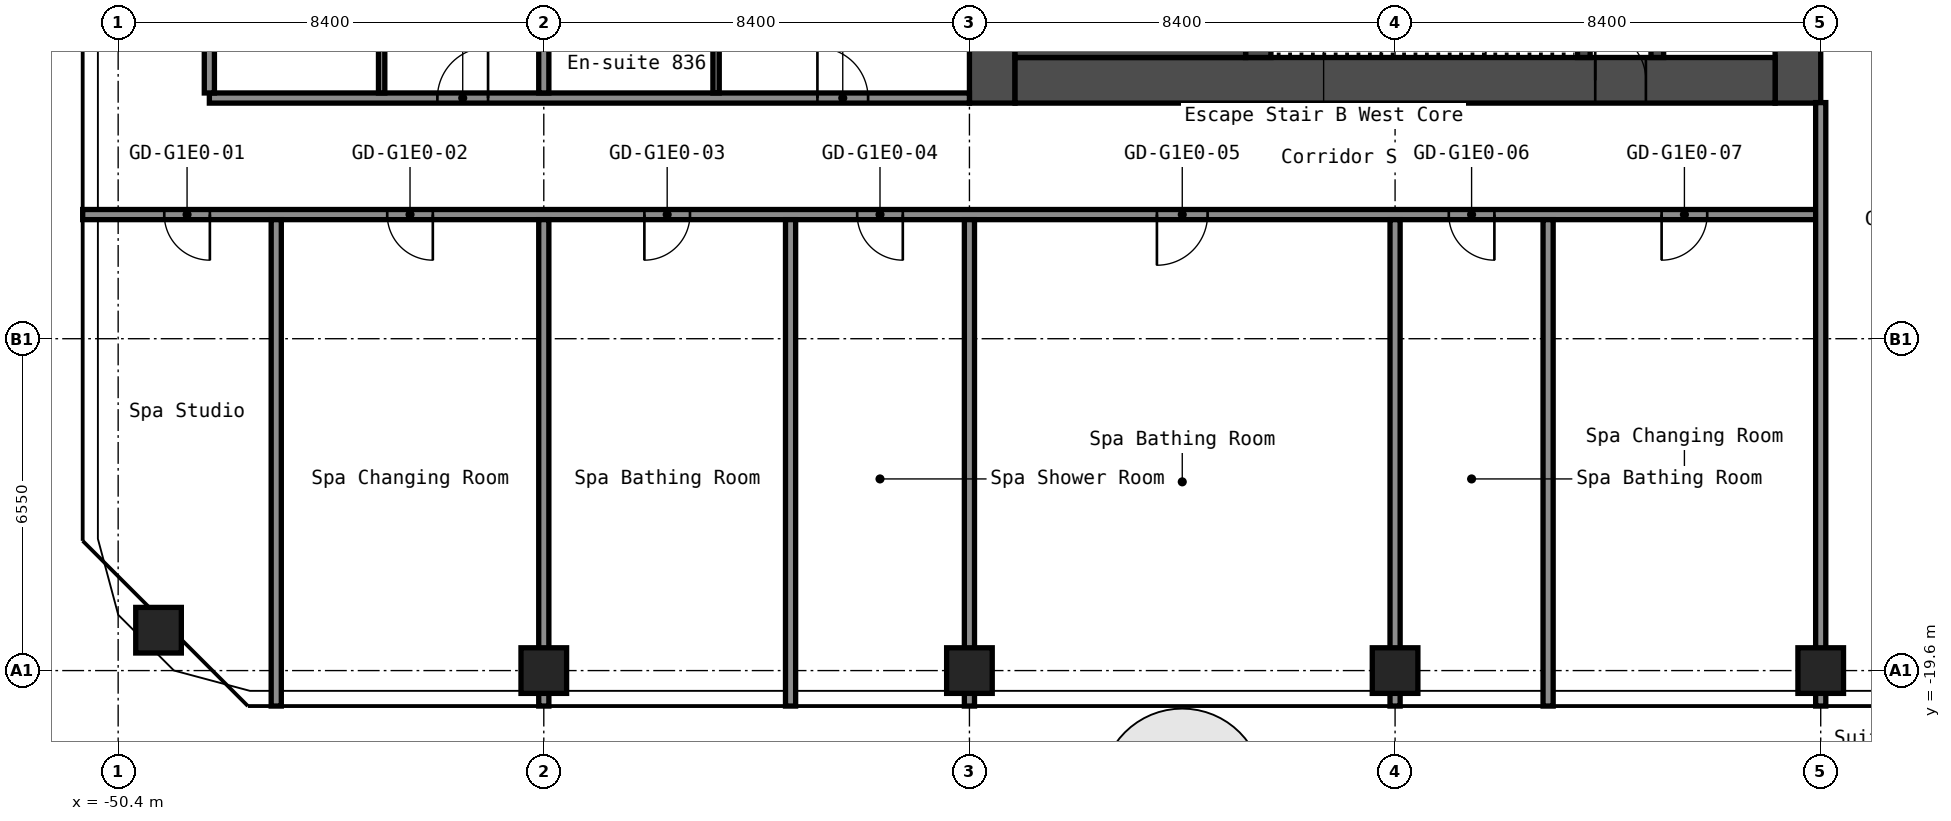
"""IFC4 building model, lengths in metres.
Left out: names, types, materials, properties, quantities, classifications, styles, units other than length and angle.
Written with IfcOpenShell. Run it as: python <this file> out.ifc"""

import sys

from ifc_helpers import new_model, si_unit, direction, frame, frame_2d, origin, origin_2d, place, context, subcontext, project, spatial, rectangle, hollow_rectangle, extrude, element, fill, save


model = new_model("IFC4")
c1 = context("Model", 3, precision=1e-05, world=origin(), true_north=direction((0.0, 1.0)))
c2 = subcontext(c1, "Body", "Model", "MODEL_VIEW")
j1 = project(units=[si_unit("LENGTHUNIT", "METRE"), si_unit("PLANEANGLEUNIT", "RADIAN")], contexts=[c1])
p1 = place(None, origin())
s1 = spatial("IfcSite", under=j1, at=p1, CompositionType="ELEMENT")
p2 = place(p1, origin())
s2 = spatial("IfcBuilding", under=s1, at=p2, CompositionType="ELEMENT")
p3 = place(p2, frame((0.0, 0.0, 32.6)))
s3 = spatial("IfcBuildingStorey", under=s2, at=p3, CompositionType="ELEMENT", Elevation=32.6)
for number, where, z_axis, x_axis in (
    (1, (-49.603, -18.803, 0.0), (0.0, 0.0, 1.0), (1.0, 0.0, 0.0)),
    (2, (-42.0, -19.6, 0.0), (0.0, 0.0, 1.0), (1.0, 0.0, 0.0)),
    (3, (-33.6, -19.6, 0.0), (0.0, 0.0, 1.0), (1.0, 0.0, 0.0)),
    (4, (-25.2, -19.6, 0.0), (0.0, 0.0, 1.0), (1.0, 0.0, 0.0)),
    (5, (-16.8, -19.6, 0.0), (0.0, 0.0, 1.0), (1.0, 0.0, 0.0)),
):
    element("IfcColumn", number, at=place(p3, frame(where, z_axis=z_axis, x_axis=x_axis)), inside=s3, PredefinedType="COLUMN", context=c2, shape_type="SweptSolid", body=[
        extrude(hollow_rectangle(XDim=0.9, YDim=0.9, WallThickness=0.036, at=origin_2d()), origin(), (0.0, 0.0, 1.0), 2.8),
    ])
p4 = place(p3, frame((-17.25, -8.4, 0.0), z_axis=(0.0, 0.0, 1.0), x_axis=(0.0, 1.0, 0.0)))
e6 = element("IfcWall", 6, at=p4, inside=s3, PredefinedType="SHEAR", context=c2, shape_type="SweptSolid", body=[
    extrude(rectangle(XDim=16.8, YDim=0.9, at=frame_2d((8.4, 0.0))), origin(), (0.0, 0.0, 1.0), 2.8),
])
p5 = place(p4, frame((12.75, 0.0, 0.0)))
e7 = element("IfcOpeningElement", 7, at=p5, cuts=e6, PredefinedType="OPENING", context=c2, shape_type="SweptSolid", body=[
    extrude(rectangle(XDim=1.2, YDim=2.1, at=frame_2d((0.6, 1.05))), frame((0.0, 0.46, 0.0), z_axis=(0.0, -1.0, 0.0), x_axis=(1.0, 0.0, 0.0)), (0.0, 0.0, 1.0), 0.92),
])
p6 = place(p4, frame((2.85, 0.0, 0.0)))
e8 = element("IfcOpeningElement", 8, at=p6, cuts=e6, PredefinedType="OPENING", context=c2, shape_type="SweptSolid", body=[
    extrude(rectangle(XDim=1.2, YDim=2.1, at=frame_2d((0.6, 1.05))), frame((0.0, 0.46, 0.0), z_axis=(0.0, -1.0, 0.0), x_axis=(1.0, 0.0, 0.0)), (0.0, 0.0, 1.0), 0.92),
])
p7 = place(p3, frame((-33.15, -8.4, 0.0), z_axis=(0.0, 0.0, 1.0), x_axis=(0.0, 1.0, 0.0)))
e9 = element("IfcWall", 9, at=p7, inside=s3, PredefinedType="SHEAR", context=c2, shape_type="SweptSolid", body=[
    extrude(rectangle(XDim=16.8, YDim=0.9, at=frame_2d((8.4, 0.0))), origin(), (0.0, 0.0, 1.0), 2.8),
])
p8 = place(p3, frame((-32.7, -7.95, 0.0), z_axis=(0.0, 0.0, 1.0), x_axis=(1.0, 0.0, 0.0)))
e10 = element("IfcWall", 10, at=p8, inside=s3, PredefinedType="SHEAR", context=c2, shape_type="SweptSolid", body=[
    extrude(rectangle(XDim=15.0, YDim=0.9, at=frame_2d((7.5, 0.0))), origin(), (0.0, 0.0, 1.0), 2.8),
])
p9 = place(p8, frame((11.45, 0.0, 0.0)))
e11 = element("IfcOpeningElement", 11, at=p9, cuts=e10, PredefinedType="OPENING", context=c2, shape_type="SweptSolid", body=[
    extrude(rectangle(XDim=1.0, YDim=2.1, at=frame_2d((0.5, 1.05))), frame((0.0, 0.46, 0.0), z_axis=(0.0, -1.0, 0.0), x_axis=(1.0, 0.0, 0.0)), (0.0, 0.0, 1.0), 0.92),
])
p10 = place(p3, frame((-20.025, -7.5, 0.0), z_axis=(0.0, 0.0, 1.0), x_axis=(0.0, 1.0, 0.0)))
e12 = element("IfcWall", 12, at=p10, inside=s3, PredefinedType="SHEAR", context=c2, shape_type="SweptSolid", body=[
    extrude(rectangle(XDim=6.3, YDim=0.25, at=frame_2d((3.15, 0.0))), origin(), (0.0, 0.0, 1.0), 2.8),
])
p11 = place(p10, frame((2.4, 0.0, 0.0)))
e13 = element("IfcOpeningElement", 13, at=p11, cuts=e12, PredefinedType="OPENING", context=c2, shape_type="SweptSolid", body=[
    extrude(rectangle(XDim=1.0, YDim=2.1, at=frame_2d((0.5, 1.05))), frame((0.0, 0.135, 0.0), z_axis=(0.0, -1.0, 0.0), x_axis=(1.0, 0.0, 0.0)), (0.0, 0.0, 1.0), 0.27),
])
p12 = place(p3, frame((-21.475, -7.5, 0.0), z_axis=(0.0, 0.0, 1.0), x_axis=(0.0, 1.0, 0.0)))
e14 = element("IfcWall", 14, at=p12, inside=s3, PredefinedType="SHEAR", context=c2, shape_type="SweptSolid", body=[
    extrude(rectangle(XDim=3.75, YDim=0.25, at=frame_2d((1.875, 0.0))), origin(), (0.0, 0.0, 1.0), 2.8),
])
p13 = place(p12, frame((1.3, 0.0, 0.0)))
e15 = element("IfcOpeningElement", 15, at=p13, cuts=e14, PredefinedType="OPENING", context=c2, shape_type="SweptSolid", body=[
    extrude(rectangle(XDim=1.2, YDim=2.1, at=frame_2d((0.6, 1.05))), frame((0.0, 0.135, 0.0), z_axis=(0.0, -1.0, 0.0), x_axis=(1.0, 0.0, 0.0)), (0.0, 0.0, 1.0), 0.27),
])
p14 = place(p3, frame((-27.9, -7.5, 0.0), z_axis=(0.0, 0.0, 1.0), x_axis=(0.0, 1.0, 0.0)))
e16 = element("IfcWall", 16, at=p14, inside=s3, PredefinedType="SHEAR", context=c2, shape_type="SweptSolid", body=[
    extrude(rectangle(XDim=3.75, YDim=0.5, at=frame_2d((1.875, 0.0))), origin(), (0.0, 0.0, 1.0), 2.8),
])
p15 = place(p3, frame((-32.7, -6.75, 0.0), z_axis=(0.0, 0.0, 1.0), x_axis=(1.0, 0.0, 0.0)))
e17 = element("IfcWall", 17, at=p15, inside=s3, PredefinedType="SHEAR", context=c2, shape_type="SweptSolid", body=[
    extrude(rectangle(XDim=4.55, YDim=1.5, at=frame_2d((2.275, 0.0))), origin(), (0.0, 0.0, 1.0), 2.8),
])
p16 = place(p3, frame((-51.1, -10.6, 0.0), z_axis=(0.0, 0.0, 1.0), x_axis=(1.0, 0.0, 0.0)))
e18 = element("IfcWall", 18, at=p16, inside=s3, PredefinedType="PARTITIONING", context=c2, shape_type="SweptSolid", body=[
    extrude(rectangle(XDim=34.3, YDim=0.2, at=frame_2d((17.15, 0.0))), origin(), (0.0, 0.0, 1.0), 2.8),
])
p17 = place(p16, frame((1.61, 0.0, 0.0)))
e19 = element("IfcOpeningElement", 19, at=p17, cuts=e18, PredefinedType="OPENING", context=c2, shape_type="SweptSolid", body=[
    extrude(rectangle(XDim=0.9, YDim=2.1, at=frame_2d((0.45, 1.05))), frame((0.0, 0.11, 0.0), z_axis=(0.0, -1.0, 0.0), x_axis=(1.0, 0.0, 0.0)), (0.0, 0.0, 1.0), 0.22),
])
p18 = place(p16, frame((6.01, 0.0, 0.0)))
e20 = element("IfcOpeningElement", 20, at=p18, cuts=e18, PredefinedType="OPENING", context=c2, shape_type="SweptSolid", body=[
    extrude(rectangle(XDim=0.9, YDim=2.1, at=frame_2d((0.45, 1.05))), frame((0.0, 0.11, 0.0), z_axis=(0.0, -1.0, 0.0), x_axis=(1.0, 0.0, 0.0)), (0.0, 0.0, 1.0), 0.22),
])
p19 = place(p16, frame((11.085, 0.0, 0.0)))
e21 = element("IfcOpeningElement", 21, at=p19, cuts=e18, PredefinedType="OPENING", context=c2, shape_type="SweptSolid", body=[
    extrude(rectangle(XDim=0.9, YDim=2.1, at=frame_2d((0.45, 1.05))), frame((0.0, 0.11, 0.0), z_axis=(0.0, -1.0, 0.0), x_axis=(1.0, 0.0, 0.0)), (0.0, 0.0, 1.0), 0.22),
])
p20 = place(p16, frame((15.285, 0.0, 0.0)))
e22 = element("IfcOpeningElement", 22, at=p20, cuts=e18, PredefinedType="OPENING", context=c2, shape_type="SweptSolid", body=[
    extrude(rectangle(XDim=0.9, YDim=2.1, at=frame_2d((0.45, 1.05))), frame((0.0, 0.11, 0.0), z_axis=(0.0, -1.0, 0.0), x_axis=(1.0, 0.0, 0.0)), (0.0, 0.0, 1.0), 0.22),
])
p21 = place(p16, frame((21.2, 0.0, 0.0)))
e23 = element("IfcOpeningElement", 23, at=p21, cuts=e18, PredefinedType="OPENING", context=c2, shape_type="SweptSolid", body=[
    extrude(rectangle(XDim=1.0, YDim=2.1, at=frame_2d((0.5, 1.05))), frame((0.0, 0.11, 0.0), z_axis=(0.0, -1.0, 0.0), x_axis=(1.0, 0.0, 0.0)), (0.0, 0.0, 1.0), 0.22),
])
p22 = place(p16, frame((26.96, 0.0, 0.0)))
e24 = element("IfcOpeningElement", 24, at=p22, cuts=e18, PredefinedType="OPENING", context=c2, shape_type="SweptSolid", body=[
    extrude(rectangle(XDim=0.9, YDim=2.1, at=frame_2d((0.45, 1.05))), frame((0.0, 0.11, 0.0), z_axis=(0.0, -1.0, 0.0), x_axis=(1.0, 0.0, 0.0)), (0.0, 0.0, 1.0), 0.22),
])
p23 = place(p16, frame((31.16, 0.0, 0.0)))
e25 = element("IfcOpeningElement", 25, at=p23, cuts=e18, PredefinedType="OPENING", context=c2, shape_type="SweptSolid", body=[
    extrude(rectangle(XDim=0.9, YDim=2.1, at=frame_2d((0.45, 1.05))), frame((0.0, 0.11, 0.0), z_axis=(0.0, -1.0, 0.0), x_axis=(1.0, 0.0, 0.0)), (0.0, 0.0, 1.0), 0.22),
])
p24 = place(p3, frame((-48.6, -8.3, 0.0), z_axis=(0.0, 0.0, 1.0), x_axis=(1.0, 0.0, 0.0)))
e26 = element("IfcWall", 26, at=p24, inside=s3, PredefinedType="PARTITIONING", context=c2, shape_type="SweptSolid", body=[
    extrude(rectangle(XDim=15.0, YDim=0.2, at=frame_2d((7.5, 0.0))), origin(), (0.0, 0.0, 1.0), 2.8),
])
p25 = place(p24, frame((4.5, 0.0, 0.0)))
e27 = element("IfcOpeningElement", 27, at=p25, cuts=e26, PredefinedType="OPENING", context=c2, shape_type="SweptSolid", body=[
    extrude(rectangle(XDim=1.0, YDim=2.1, at=frame_2d((0.5, 1.05))), frame((0.0, 0.11, 0.0), z_axis=(0.0, -1.0, 0.0), x_axis=(1.0, 0.0, 0.0)), (0.0, 0.0, 1.0), 0.22),
])
p26 = place(p24, frame((12.0, 0.0, 0.0)))
e28 = element("IfcOpeningElement", 28, at=p26, cuts=e26, PredefinedType="OPENING", context=c2, shape_type="SweptSolid", body=[
    extrude(rectangle(XDim=1.0, YDim=2.1, at=frame_2d((0.5, 1.05))), frame((0.0, 0.11, 0.0), z_axis=(0.0, -1.0, 0.0), x_axis=(1.0, 0.0, 0.0)), (0.0, 0.0, 1.0), 0.22),
])
p27 = place(p3, frame((-48.6, -8.2, 0.0), z_axis=(0.0, 0.0, 1.0), x_axis=(0.0, 1.0, 0.0)))
e29 = element("IfcWall", 29, at=p27, inside=s3, PredefinedType="PARTITIONING", context=c2, shape_type="SweptSolid", body=[
    extrude(rectangle(XDim=16.4, YDim=0.2, at=frame_2d((8.2, 0.0))), origin(), (0.0, 0.0, 1.0), 2.8),
])
p28 = place(p3, frame((-47.28, -20.3, 0.0), z_axis=(0.0, 0.0, 1.0), x_axis=(0.0, 1.0, 0.0)))
e30 = element("IfcWall", 30, at=p28, inside=s3, PredefinedType="PARTITIONING", context=c2, shape_type="SweptSolid", body=[
    extrude(rectangle(XDim=9.6, YDim=0.2, at=frame_2d((4.8, 0.0))), origin(), (0.0, 0.0, 1.0), 2.8),
])
p29 = place(p3, frame((-45.2, -8.2, 0.0), z_axis=(0.0, 0.0, 1.0), x_axis=(0.0, 1.0, 0.0)))
e31 = element("IfcWall", 31, at=p29, inside=s3, PredefinedType="PARTITIONING", context=c2, shape_type="SweptSolid", body=[
    extrude(rectangle(XDim=3.3, YDim=0.125, at=frame_2d((1.65, 0.0))), origin(), (0.0, 0.0, 1.0), 2.8),
])
p30 = place(p3, frame((-42.0, -20.3, 0.0), z_axis=(0.0, 0.0, 1.0), x_axis=(0.0, 1.0, 0.0)))
e32 = element("IfcWall", 32, at=p30, inside=s3, PredefinedType="PARTITIONING", context=c2, shape_type="SweptSolid", body=[
    extrude(rectangle(XDim=9.6, YDim=0.2, at=frame_2d((4.8, 0.0))), origin(), (0.0, 0.0, 1.0), 2.8),
])
p31 = place(p3, frame((-42.0, -8.2, 0.0), z_axis=(0.0, 0.0, 1.0), x_axis=(0.0, 1.0, 0.0)))
e33 = element("IfcWall", 33, at=p31, inside=s3, PredefinedType="PARTITIONING", context=c2, shape_type="SweptSolid", body=[
    extrude(rectangle(XDim=16.4, YDim=0.2, at=frame_2d((8.2, 0.0))), origin(), (0.0, 0.0, 1.0), 2.8),
])
p32 = place(p3, frame((-38.6, -8.2, 0.0), z_axis=(0.0, 0.0, 1.0), x_axis=(0.0, 1.0, 0.0)))
e34 = element("IfcWall", 34, at=p32, inside=s3, PredefinedType="PARTITIONING", context=c2, shape_type="SweptSolid", body=[
    extrude(rectangle(XDim=3.3, YDim=0.125, at=frame_2d((1.65, 0.0))), origin(), (0.0, 0.0, 1.0), 2.8),
])
for number, where, z_axis, x_axis in (
    (35, (-37.13, -20.3, 0.0), (0.0, 0.0, 1.0), (0.0, 1.0, 0.0)),
    (36, (-33.6, -20.3, 0.0), (0.0, 0.0, 1.0), (0.0, 1.0, 0.0)),
    (37, (-25.2, -20.3, 0.0), (0.0, 0.0, 1.0), (0.0, 1.0, 0.0)),
    (38, (-22.18, -20.3, 0.0), (0.0, 0.0, 1.0), (0.0, 1.0, 0.0)),
):
    element("IfcWall", number, at=place(p3, frame(where, z_axis=z_axis, x_axis=x_axis)), inside=s3, PredefinedType="PARTITIONING", context=c2, shape_type="SweptSolid", body=[
        extrude(rectangle(XDim=9.6, YDim=0.2, at=frame_2d((4.8, 0.0))), origin(), (0.0, 0.0, 1.0), 2.8),
    ])
p33 = place(p3, frame((-16.8, -20.3, 0.0), z_axis=(0.0, 0.0, 1.0), x_axis=(0.0, 1.0, 0.0)))
e39 = element("IfcWall", 39, at=p33, inside=s3, PredefinedType="PARTITIONING", context=c2, shape_type="SweptSolid", body=[
    extrude(rectangle(XDim=11.91, YDim=0.2, at=frame_2d((5.955, 0.0))), origin(), (0.0, 0.0, 1.0), 2.8),
])
p34 = place(p9, origin())
e40 = element("IfcDoor", 40, at=p34, inside=s3, OperationType="SINGLE_SWING_RIGHT", PredefinedType="DOOR", context=c2, shape_type="SweptSolid", body=[
    extrude(rectangle(XDim=1.0, YDim=2.1, at=frame_2d((0.5, 1.05))), frame((0.0, 0.025, 0.0), z_axis=(0.0, -1.0, 0.0), x_axis=(1.0, 0.0, 0.0)), (0.0, 0.0, 1.0), 0.05),
])
fill(e11, e40)
p35 = place(p17, origin())
e41 = element("IfcDoor", 41, at=p35, inside=s3, OperationType="SINGLE_SWING_RIGHT", PredefinedType="DOOR", context=c2, shape_type="SweptSolid", body=[
    extrude(rectangle(XDim=0.9, YDim=2.1, at=frame_2d((0.45, 1.05))), frame((0.0, 0.025, 0.0), z_axis=(0.0, -1.0, 0.0), x_axis=(1.0, 0.0, 0.0)), (0.0, 0.0, 1.0), 0.05),
])
fill(e19, e41)
p36 = place(p18, origin())
e42 = element("IfcDoor", 42, at=p36, inside=s3, OperationType="SINGLE_SWING_RIGHT", PredefinedType="DOOR", context=c2, shape_type="SweptSolid", body=[
    extrude(rectangle(XDim=0.9, YDim=2.1, at=frame_2d((0.45, 1.05))), frame((0.0, 0.025, 0.0), z_axis=(0.0, -1.0, 0.0), x_axis=(1.0, 0.0, 0.0)), (0.0, 0.0, 1.0), 0.05),
])
fill(e20, e42)
p37 = place(p19, origin())
e43 = element("IfcDoor", 43, at=p37, inside=s3, OperationType="SINGLE_SWING_LEFT", PredefinedType="DOOR", context=c2, shape_type="SweptSolid", body=[
    extrude(rectangle(XDim=0.9, YDim=2.1, at=frame_2d((0.45, 1.05))), frame((0.0, 0.025, 0.0), z_axis=(0.0, -1.0, 0.0), x_axis=(1.0, 0.0, 0.0)), (0.0, 0.0, 1.0), 0.05),
])
fill(e21, e43)
p38 = place(p20, origin())
e44 = element("IfcDoor", 44, at=p38, inside=s3, OperationType="SINGLE_SWING_RIGHT", PredefinedType="DOOR", context=c2, shape_type="SweptSolid", body=[
    extrude(rectangle(XDim=0.9, YDim=2.1, at=frame_2d((0.45, 1.05))), frame((0.0, 0.025, 0.0), z_axis=(0.0, -1.0, 0.0), x_axis=(1.0, 0.0, 0.0)), (0.0, 0.0, 1.0), 0.05),
])
fill(e22, e44)
p39 = place(p21, origin())
e45 = element("IfcDoor", 45, at=p39, inside=s3, OperationType="SINGLE_SWING_LEFT", PredefinedType="DOOR", context=c2, shape_type="SweptSolid", body=[
    extrude(rectangle(XDim=1.0, YDim=2.1, at=frame_2d((0.5, 1.05))), frame((0.0, 0.025, 0.0), z_axis=(0.0, -1.0, 0.0), x_axis=(1.0, 0.0, 0.0)), (0.0, 0.0, 1.0), 0.05),
])
fill(e23, e45)
p40 = place(p22, origin())
e46 = element("IfcDoor", 46, at=p40, inside=s3, OperationType="SINGLE_SWING_RIGHT", PredefinedType="DOOR", context=c2, shape_type="SweptSolid", body=[
    extrude(rectangle(XDim=0.9, YDim=2.1, at=frame_2d((0.45, 1.05))), frame((0.0, 0.025, 0.0), z_axis=(0.0, -1.0, 0.0), x_axis=(1.0, 0.0, 0.0)), (0.0, 0.0, 1.0), 0.05),
])
fill(e24, e46)
p41 = place(p23, origin())
e47 = element("IfcDoor", 47, at=p41, inside=s3, OperationType="SINGLE_SWING_LEFT", PredefinedType="DOOR", context=c2, shape_type="SweptSolid", body=[
    extrude(rectangle(XDim=0.9, YDim=2.1, at=frame_2d((0.45, 1.05))), frame((0.0, 0.025, 0.0), z_axis=(0.0, -1.0, 0.0), x_axis=(1.0, 0.0, 0.0)), (0.0, 0.0, 1.0), 0.05),
])
fill(e25, e47)
p42 = place(p25, origin())
e48 = element("IfcDoor", 48, at=p42, inside=s3, OperationType="SINGLE_SWING_LEFT", PredefinedType="DOOR", context=c2, shape_type="SweptSolid", body=[
    extrude(rectangle(XDim=1.0, YDim=2.1, at=frame_2d((0.5, 1.05))), frame((0.0, 0.025, 0.0), z_axis=(0.0, -1.0, 0.0), x_axis=(1.0, 0.0, 0.0)), (0.0, 0.0, 1.0), 0.05),
])
fill(e27, e48)
p43 = place(p26, origin())
e49 = element("IfcDoor", 49, at=p43, inside=s3, OperationType="SINGLE_SWING_RIGHT", PredefinedType="DOOR", context=c2, shape_type="SweptSolid", body=[
    extrude(rectangle(XDim=1.0, YDim=2.1, at=frame_2d((0.5, 1.05))), frame((0.0, 0.025, 0.0), z_axis=(0.0, -1.0, 0.0), x_axis=(1.0, 0.0, 0.0)), (0.0, 0.0, 1.0), 0.05),
])
fill(e28, e49)
save(model, sys.argv[1])
